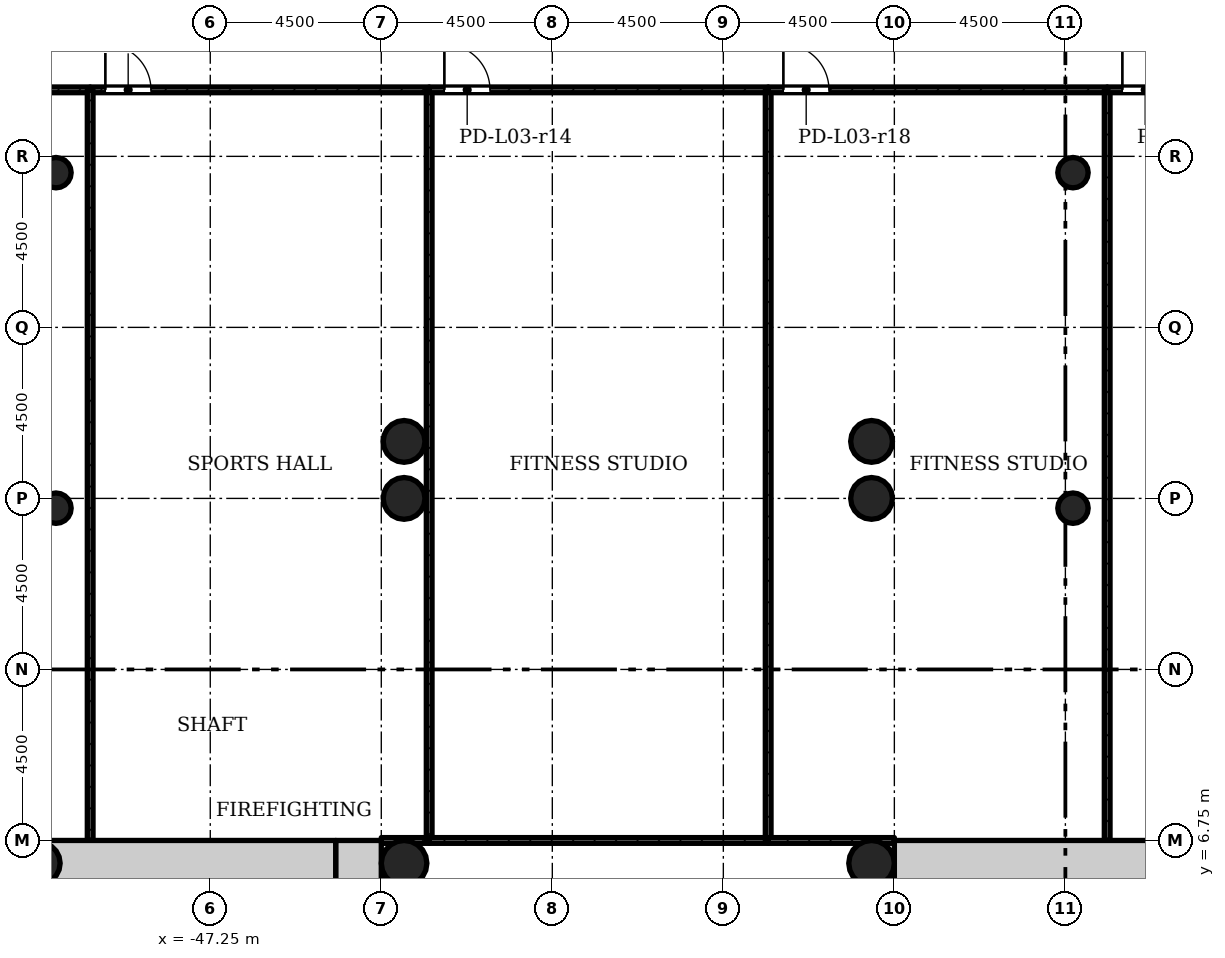
"""IFC4 building model, lengths in metres.
Left out: names, types, materials, properties, quantities, classifications, styles, units other than length and angle.
Written with IfcOpenShell. Run it as: python <this file> out.ifc"""

import sys

from ifc_helpers import new_model, si_unit, direction, frame, frame_2d, origin, origin_2d, place, context, subcontext, project, spatial, rectangle, hollow_circle, extrude, element, fill, save


model = new_model("IFC4")
c1 = context("Model", 3, precision=1e-05, world=origin(), true_north=direction((0.0, 1.0)))
c2 = subcontext(c1, "Body", "Model", "MODEL_VIEW")
j1 = project(units=[si_unit("LENGTHUNIT", "METRE"), si_unit("PLANEANGLEUNIT", "RADIAN")], contexts=[c1])
p1 = place(None, origin())
s1 = spatial("IfcSite", under=j1, at=p1, CompositionType="ELEMENT")
p2 = place(p1, origin())
s2 = spatial("IfcBuilding", under=s1, at=p2, CompositionType="ELEMENT")
p3 = place(p2, frame((0.0, 0.0, 15.5)))
s3 = spatial("IfcBuildingStorey", under=s2, at=p3, CompositionType="ELEMENT", Elevation=15.5)
p4 = place(p3, frame((-21.45, 6.15, 0.0), z_axis=(0.0, 0.0, 1.0), x_axis=(-1.0, 0.0, 0.0)))
e1 = element("IfcWall", 1, at=p4, inside=s3, PredefinedType="SHEAR", context=c2, shape_type="SweptSolid", body=[
    extrude(rectangle(XDim=7.8, YDim=1.2, at=frame_2d((3.9, 0.0))), origin(), (0.0, 0.0, 1.0), 4.5),
])
p5 = place(p3, frame((-43.35, -5.55, 0.0), z_axis=(0.0, 0.0, 1.0), x_axis=(0.0, 1.0, 0.0)))
e2 = element("IfcWall", 2, at=p5, inside=s3, PredefinedType="SHEAR", context=c2, shape_type="SweptSolid", body=[
    extrude(rectangle(XDim=12.3, YDim=1.2, at=frame_2d((6.15, 0.0))), origin(), (0.0, 0.0, 1.0), 4.5),
])
p6 = place(p5, frame((4.65, 0.0, 0.0)))
e3 = element("IfcOpeningElement", 3, at=p6, cuts=e2, PredefinedType="OPENING", context=c2, shape_type="SweptSolid", body=[
    extrude(rectangle(XDim=1.8, YDim=2.1, at=frame_2d((0.9, 1.05))), frame((0.0, 0.61, 0.0), z_axis=(0.0, -1.0, 0.0), x_axis=(1.0, 0.0, 0.0)), (0.0, 0.0, 1.0), 1.22),
])
p7 = place(p3, frame((-43.95, 6.15, 0.0), z_axis=(0.0, 0.0, 1.0), x_axis=(-1.0, 0.0, 0.0)))
e4 = element("IfcWall", 4, at=p7, inside=s3, PredefinedType="SHEAR", context=c2, shape_type="SweptSolid", body=[
    extrude(rectangle(XDim=7.8, YDim=1.2, at=frame_2d((3.9, 0.0))), origin(), (0.0, 0.0, 1.0), 4.5),
])
for number, where, z_axis, x_axis in (
    (5, (-29.85, 15.75, 0.0), (0.0, 0.0, 1.0), (1.0, 0.0, 0.0)),
    (6, (-42.15, 15.75, 0.0), (0.0, 0.0, 1.0), (1.0, 0.0, 0.0)),
    (7, (-29.85, 17.25, 0.0), (0.0, 0.0, 1.0), (1.0, 0.0, 0.0)),
    (8, (-42.15, 17.25, 0.0), (0.0, 0.0, 1.0), (1.0, 0.0, 0.0)),
    (9, (-51.75, 6.15, 0.0), (0.0, 0.0, 1.0), (1.0, 0.0, 0.0)),
):
    element("IfcColumn", number, at=place(p3, frame(where, z_axis=z_axis, x_axis=x_axis)), inside=s3, PredefinedType="COLUMN", context=c2, shape_type="SweptSolid", body=[
        extrude(hollow_circle(Radius=0.55, WallThickness=0.04, at=origin_2d()), origin(), (0.0, 0.0, 1.0), 4.5),
    ])
for number, where, z_axis, x_axis in (
    (10, (-29.85, 6.15, 0.0), (0.0, 0.0, 1.0), (1.0, 0.0, 0.0)),
    (11, (-42.15, 6.15, 0.0), (0.0, 0.0, 1.0), (1.0, 0.0, 0.0)),
):
    element("IfcColumn", number, at=place(p3, frame(where, z_axis=z_axis, x_axis=x_axis)), inside=s3, PredefinedType="COLUMN", context=c2, shape_type="SweptSolid", body=[
        extrude(hollow_circle(Radius=0.6, WallThickness=0.045, at=origin_2d()), origin(), (0.0, 0.0, 1.0), 4.5),
    ])
for number, where, z_axis, x_axis in (
    (12, (-51.31, 15.493, 0.0), (0.0, 0.0, 1.0), (1.0, 0.0, 0.0)),
    (13, (-24.55, 15.493, 0.0), (0.0, 0.0, 1.0), (1.0, 0.0, 0.0)),
    (14, (-51.31, 24.321, 0.0), (0.0, 0.0, 1.0), (1.0, 0.0, 0.0)),
    (15, (-24.55, 24.321, 0.0), (0.0, 0.0, 1.0), (1.0, 0.0, 0.0)),
):
    element("IfcColumn", number, at=place(p3, frame(where, z_axis=z_axis, x_axis=x_axis)), inside=s3, PredefinedType="COLUMN", context=c2, shape_type="SweptSolid", body=[
        extrude(hollow_circle(Radius=0.4, WallThickness=0.028, at=origin_2d()), origin(), (0.0, 0.0, 1.0), 4.5),
    ])
p8 = place(p3, frame((-52.37, 26.5, 0.0), z_axis=(0.0, 0.0, 1.0), x_axis=(1.0, 0.0, 0.0)))
e16 = element("IfcWall", 16, at=p8, inside=s3, PredefinedType="PARTITIONING", context=c2, shape_type="SweptSolid", body=[
    extrude(rectangle(XDim=1.96, YDim=0.15, at=frame_2d((0.98, 0.0))), origin(), (0.0, 0.0, 1.0), 4.08),
])
p9 = place(p3, frame((-50.41, 26.5, 0.0), z_axis=(0.0, 0.0, 1.0), x_axis=(1.0, 0.0, 0.0)))
e17 = element("IfcWall", 17, at=p9, inside=s3, PredefinedType="PARTITIONING", context=c2, shape_type="SweptSolid", body=[
    extrude(rectangle(XDim=8.92, YDim=0.15, at=frame_2d((4.46, 0.0))), origin(), (0.0, 0.0, 1.0), 4.08),
])
p10 = place(p9, frame((0.4, 0.0, 0.0)))
e18 = element("IfcOpeningElement", 18, at=p10, cuts=e17, PredefinedType="OPENING", context=c2, shape_type="SweptSolid", body=[
    extrude(rectangle(XDim=1.2, YDim=2.1, at=frame_2d((0.6, 1.05))), frame((0.0, 0.085, 0.0), z_axis=(0.0, -1.0, 0.0), x_axis=(1.0, 0.0, 0.0)), (0.0, 0.0, 1.0), 0.17),
])
p11 = place(p3, frame((-41.49, 6.75, 0.0), z_axis=(0.0, 0.0, 1.0), x_axis=(-1.0, 0.0, 0.0)))
e19 = element("IfcWall", 19, at=p11, inside=s3, PredefinedType="PARTITIONING", context=c2, shape_type="SweptSolid", body=[
    extrude(rectangle(XDim=1.26, YDim=0.15, at=frame_2d((0.63, 0.0))), origin(), (0.0, 0.0, 1.0), 4.08),
])
for number, where, z_axis, x_axis in (
    (20, (-50.41, 6.75, 0.0), (0.0, 0.0, 1.0), (0.0, 1.0, 0.0)),
    (21, (-41.49, 26.5, 0.0), (0.0, 0.0, 1.0), (0.0, -1.0, 0.0)),
):
    element("IfcWall", number, at=place(p3, frame(where, z_axis=z_axis, x_axis=x_axis)), inside=s3, PredefinedType="PARTITIONING", context=c2, shape_type="SweptSolid", body=[
        extrude(rectangle(XDim=19.75, YDim=0.15, at=frame_2d((9.875, 0.0))), origin(), (0.0, 0.0, 1.0), 4.08),
    ])
p12 = place(p3, frame((-41.49, 26.5, 0.0), z_axis=(0.0, 0.0, 1.0), x_axis=(1.0, 0.0, 0.0)))
e22 = element("IfcWall", 22, at=p12, inside=s3, PredefinedType="PARTITIONING", context=c2, shape_type="SweptSolid", body=[
    extrude(rectangle(XDim=8.92, YDim=0.15, at=frame_2d((4.46, 0.0))), origin(), (0.0, 0.0, 1.0), 4.08),
])
p13 = place(p12, frame((0.4, 0.0, 0.0)))
e23 = element("IfcOpeningElement", 23, at=p13, cuts=e22, PredefinedType="OPENING", context=c2, shape_type="SweptSolid", body=[
    extrude(rectangle(XDim=1.2, YDim=2.1, at=frame_2d((0.6, 1.05))), frame((0.0, 0.085, 0.0), z_axis=(0.0, -1.0, 0.0), x_axis=(1.0, 0.0, 0.0)), (0.0, 0.0, 1.0), 0.17),
])
p14 = place(p3, frame((-32.57, 6.75, 0.0), z_axis=(0.0, 0.0, 1.0), x_axis=(-1.0, 0.0, 0.0)))
e24 = element("IfcWall", 24, at=p14, inside=s3, PredefinedType="PARTITIONING", context=c2, shape_type="SweptSolid", body=[
    extrude(rectangle(XDim=8.92, YDim=0.15, at=frame_2d((4.46, 0.0))), origin(), (0.0, 0.0, 1.0), 4.08),
])
p15 = place(p3, frame((-32.57, 26.5, 0.0), z_axis=(0.0, 0.0, 1.0), x_axis=(0.0, -1.0, 0.0)))
e25 = element("IfcWall", 25, at=p15, inside=s3, PredefinedType="PARTITIONING", context=c2, shape_type="SweptSolid", body=[
    extrude(rectangle(XDim=19.75, YDim=0.15, at=frame_2d((9.875, 0.0))), origin(), (0.0, 0.0, 1.0), 4.08),
])
p16 = place(p3, frame((-29.25, 6.75, 0.0), z_axis=(0.0, 0.0, 1.0), x_axis=(-1.0, 0.0, 0.0)))
e26 = element("IfcWall", 26, at=p16, inside=s3, PredefinedType="PARTITIONING", context=c2, shape_type="SweptSolid", body=[
    extrude(rectangle(XDim=3.32, YDim=0.15, at=frame_2d((1.66, 0.0))), origin(), (0.0, 0.0, 1.0), 4.08),
])
p17 = place(p3, frame((-32.57, 26.5, 0.0), z_axis=(0.0, 0.0, 1.0), x_axis=(1.0, 0.0, 0.0)))
e27 = element("IfcWall", 27, at=p17, inside=s3, PredefinedType="PARTITIONING", context=c2, shape_type="SweptSolid", body=[
    extrude(rectangle(XDim=8.92, YDim=0.15, at=frame_2d((4.46, 0.0))), origin(), (0.0, 0.0, 1.0), 4.08),
])
p18 = place(p17, frame((0.4, 0.0, 0.0)))
e28 = element("IfcOpeningElement", 28, at=p18, cuts=e27, PredefinedType="OPENING", context=c2, shape_type="SweptSolid", body=[
    extrude(rectangle(XDim=1.2, YDim=2.1, at=frame_2d((0.6, 1.05))), frame((0.0, 0.085, 0.0), z_axis=(0.0, -1.0, 0.0), x_axis=(1.0, 0.0, 0.0)), (0.0, 0.0, 1.0), 0.17),
])
p19 = place(p3, frame((-23.65, 26.5, 0.0), z_axis=(0.0, 0.0, 1.0), x_axis=(0.0, -1.0, 0.0)))
e29 = element("IfcWall", 29, at=p19, inside=s3, PredefinedType="PARTITIONING", context=c2, shape_type="SweptSolid", body=[
    extrude(rectangle(XDim=19.75, YDim=0.15, at=frame_2d((9.875, 0.0))), origin(), (0.0, 0.0, 1.0), 4.08),
])
p20 = place(p3, frame((-23.65, 26.5, 0.0), z_axis=(0.0, 0.0, 1.0), x_axis=(1.0, 0.0, 0.0)))
e30 = element("IfcWall", 30, at=p20, inside=s3, PredefinedType="PARTITIONING", context=c2, shape_type="SweptSolid", body=[
    extrude(rectangle(XDim=8.92, YDim=0.15, at=frame_2d((4.46, 0.0))), origin(), (0.0, 0.0, 1.0), 4.08),
])
p21 = place(p20, frame((0.4, 0.0, 0.0)))
e31 = element("IfcOpeningElement", 31, at=p21, cuts=e30, PredefinedType="OPENING", context=c2, shape_type="SweptSolid", body=[
    extrude(rectangle(XDim=1.2, YDim=2.1, at=frame_2d((0.6, 1.05))), frame((0.0, 0.085, 0.0), z_axis=(0.0, -1.0, 0.0), x_axis=(1.0, 0.0, 0.0)), (0.0, 0.0, 1.0), 0.17),
])
p22 = place(p10, origin())
e32 = element("IfcDoor", 32, at=p22, inside=s3, OperationType="SINGLE_SWING_RIGHT", PredefinedType="DOOR", context=c2, shape_type="SweptSolid", body=[
    extrude(rectangle(XDim=1.2, YDim=2.1, at=frame_2d((0.6, 1.05))), frame((0.0, 0.025, 0.0), z_axis=(0.0, -1.0, 0.0), x_axis=(1.0, 0.0, 0.0)), (0.0, 0.0, 1.0), 0.05),
])
fill(e18, e32)
p23 = place(p13, origin())
e33 = element("IfcDoor", 33, at=p23, inside=s3, OperationType="SINGLE_SWING_RIGHT", PredefinedType="DOOR", context=c2, shape_type="SweptSolid", body=[
    extrude(rectangle(XDim=1.2, YDim=2.1, at=frame_2d((0.6, 1.05))), frame((0.0, 0.025, 0.0), z_axis=(0.0, -1.0, 0.0), x_axis=(1.0, 0.0, 0.0)), (0.0, 0.0, 1.0), 0.05),
])
fill(e23, e33)
p24 = place(p18, origin())
e34 = element("IfcDoor", 34, at=p24, inside=s3, OperationType="SINGLE_SWING_RIGHT", PredefinedType="DOOR", context=c2, shape_type="SweptSolid", body=[
    extrude(rectangle(XDim=1.2, YDim=2.1, at=frame_2d((0.6, 1.05))), frame((0.0, 0.025, 0.0), z_axis=(0.0, -1.0, 0.0), x_axis=(1.0, 0.0, 0.0)), (0.0, 0.0, 1.0), 0.05),
])
fill(e28, e34)
p25 = place(p21, origin())
e35 = element("IfcDoor", 35, at=p25, inside=s3, OperationType="SINGLE_SWING_RIGHT", PredefinedType="DOOR", context=c2, shape_type="SweptSolid", body=[
    extrude(rectangle(XDim=1.2, YDim=2.1, at=frame_2d((0.6, 1.05))), frame((0.0, 0.025, 0.0), z_axis=(0.0, -1.0, 0.0), x_axis=(1.0, 0.0, 0.0)), (0.0, 0.0, 1.0), 0.05),
])
fill(e31, e35)
save(model, sys.argv[1])
